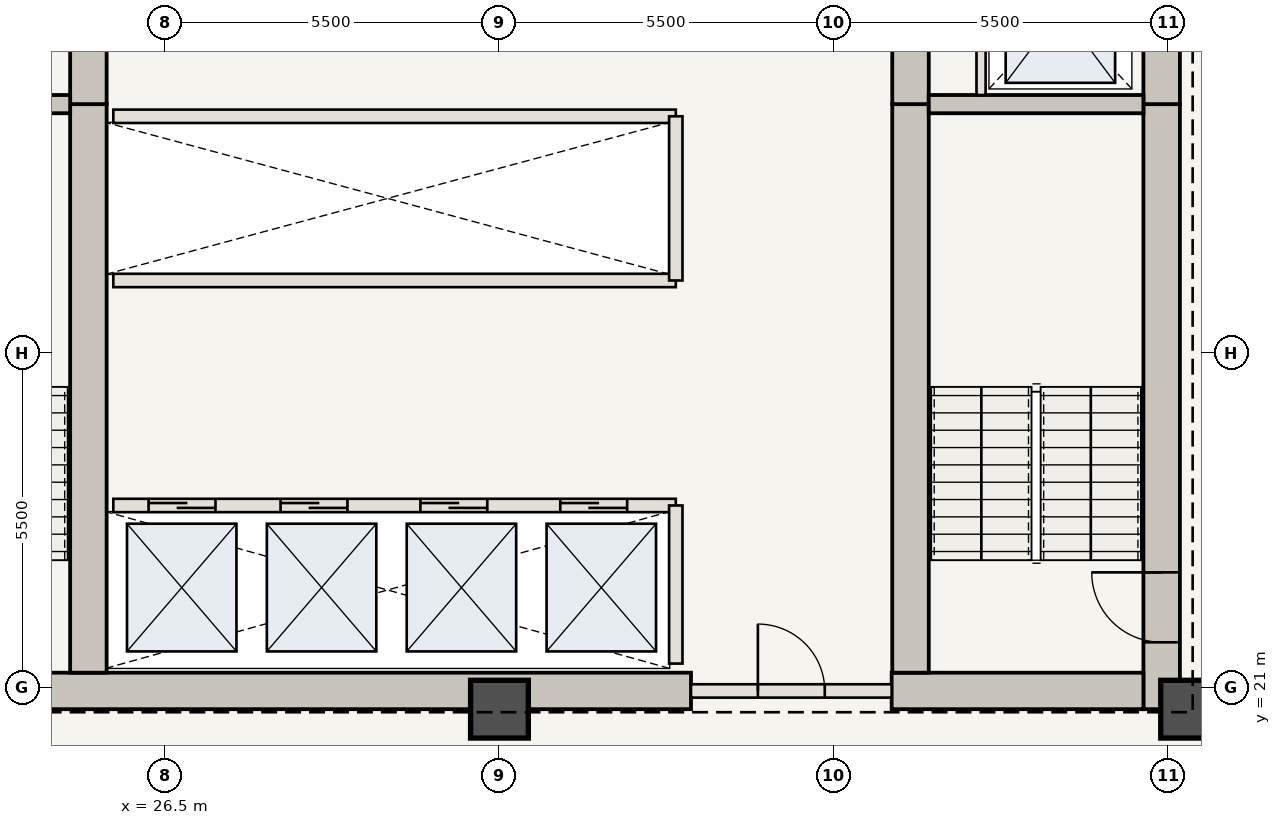
"""IFC4 building model, lengths in metres.
Left out: names, types, materials, properties, quantities, classifications, styles, units other than length and angle.
Written with IfcOpenShell. Run it as: python <this file> out.ifc"""

import sys

from ifc_helpers import new_model, si_unit, direction, frame, frame_2d, origin, origin_2d, place, context, subcontext, project, spatial, rectangle, extrude, element, fill, save


model = new_model("IFC4")
c1 = context("Model", 3, precision=1e-05, world=origin(), true_north=direction((0.0, 1.0)))
c2 = subcontext(c1, "Body", "Model", "MODEL_VIEW")
j1 = project(units=[si_unit("LENGTHUNIT", "METRE"), si_unit("PLANEANGLEUNIT", "RADIAN")], contexts=[c1])
p1 = place(None, origin())
s1 = spatial("IfcSite", under=j1, at=p1, CompositionType="ELEMENT")
p2 = place(p1, origin())
s2 = spatial("IfcBuilding", under=s1, at=p2, CompositionType="ELEMENT")
p3 = place(p2, frame((0.0, 0.0, 160.65)))
s3 = spatial("IfcBuildingStorey", under=s2, at=p3, CompositionType="ELEMENT", Elevation=160.65)
p4 = place(p3, frame((42.89, 20.65, 0.0), z_axis=(0.0, 0.0, 1.0), x_axis=(0.0, 1.0, 0.0)))
e1 = element("IfcWall", 1, at=p4, inside=s3, PredefinedType="SHEAR", context=c2, shape_type="SweptSolid", body=[
    extrude(rectangle(XDim=9.95, YDim=0.6, at=frame_2d((4.975, 0.0))), origin(), (0.0, 0.0, 1.0), 3.85),
])
p5 = place(p4, frame((1.1, 0.0, 0.0)))
e2 = element("IfcOpeningElement", 2, at=p5, cuts=e1, PredefinedType="OPENING", context=c2, shape_type="SweptSolid", body=[
    extrude(rectangle(XDim=1.15, YDim=2.15, at=frame_2d((0.575, 1.075))), frame((0.0, 0.31, 0.0), z_axis=(0.0, -1.0, 0.0), x_axis=(1.0, 0.0, 0.0)), (0.0, 0.0, 1.0), 0.62),
])
p6 = place(p3, frame((42.89, 30.6, 0.0), z_axis=(0.0, 0.0, 1.0), x_axis=(0.0, 1.0, 0.0)))
e3 = element("IfcWall", 3, at=p6, inside=s3, PredefinedType="SHEAR", context=c2, shape_type="SweptSolid", body=[
    extrude(rectangle(XDim=12.7, YDim=0.6, at=frame_2d((6.35, 0.0))), origin(), (0.0, 0.0, 1.0), 3.85),
])
p7 = place(p6, frame((4.2, 0.0, 0.0)))
e4 = element("IfcOpeningElement", 4, at=p7, cuts=e3, PredefinedType="OPENING", context=c2, shape_type="SweptSolid", body=[
    extrude(rectangle(XDim=1.1, YDim=2.15, at=frame_2d((0.55, 1.075))), frame((0.0, 0.31, 0.0), z_axis=(0.0, -1.0, 0.0), x_axis=(1.0, 0.0, 0.0)), (0.0, 0.0, 1.0), 0.62),
])
p8 = place(p6, frame((8.4, 0.0, 0.0)))
e5 = element("IfcOpeningElement", 5, at=p8, cuts=e3, PredefinedType="OPENING", context=c2, shape_type="SweptSolid", body=[
    extrude(rectangle(XDim=0.88, YDim=2.1, at=frame_2d((0.44, 1.05))), frame((0.0, 0.31, 0.0), z_axis=(0.0, -1.0, 0.0), x_axis=(1.0, 0.0, 0.0)), (0.0, 0.0, 1.0), 0.62),
])
p9 = place(p6, frame((10.5, 0.0, 0.0)))
e6 = element("IfcOpeningElement", 6, at=p9, cuts=e3, PredefinedType="OPENING", context=c2, shape_type="SweptSolid", body=[
    extrude(rectangle(XDim=0.88, YDim=2.1, at=frame_2d((0.44, 1.05))), frame((0.0, 0.31, 0.0), z_axis=(0.0, -1.0, 0.0), x_axis=(1.0, 0.0, 0.0)), (0.0, 0.0, 1.0), 0.62),
])
p10 = place(p3, frame((21.41, 20.95, 0.0), z_axis=(0.0, 0.0, 1.0), x_axis=(1.0, 0.0, 0.0)))
e7 = element("IfcWall", 7, at=p10, inside=s3, PredefinedType="SHEAR", context=c2, shape_type="SweptSolid", body=[
    extrude(rectangle(XDim=13.74, YDim=0.6, at=frame_2d((6.87, 0.0))), origin(), (0.0, 0.0, 1.0), 3.85),
])
p11 = place(p3, frame((38.45, 20.95, 0.0), z_axis=(0.0, 0.0, 1.0), x_axis=(1.0, 0.0, 0.0)))
e8 = element("IfcWall", 8, at=p11, inside=s3, PredefinedType="SHEAR", context=c2, shape_type="SweptSolid", body=[
    extrude(rectangle(XDim=4.14, YDim=0.6, at=frame_2d((2.07, 0.0))), origin(), (0.0, 0.0, 1.0), 3.85),
])
p12 = place(p3, frame((25.24, 21.25, 0.0), z_axis=(0.0, 0.0, 1.0), x_axis=(0.0, 1.0, 0.0)))
e9 = element("IfcWall", 9, at=p12, inside=s3, PredefinedType="SHEAR", context=c2, shape_type="SweptSolid", body=[
    extrude(rectangle(XDim=9.35, YDim=0.6, at=frame_2d((4.675, 0.0))), origin(), (0.0, 0.0, 1.0), 3.85),
])
p13 = place(p3, frame((25.24, 30.6, 0.0), z_axis=(0.0, 0.0, 1.0), x_axis=(0.0, 1.0, 0.0)))
e10 = element("IfcWall", 10, at=p13, inside=s3, PredefinedType="SHEAR", context=c2, shape_type="SweptSolid", body=[
    extrude(rectangle(XDim=12.1, YDim=0.6, at=frame_2d((6.05, 0.0))), origin(), (0.0, 0.0, 1.0), 3.85),
])
p14 = place(p13, frame((6.25, 0.0, 0.0)))
e11 = element("IfcOpeningElement", 11, at=p14, cuts=e10, PredefinedType="OPENING", context=c2, shape_type="SweptSolid", body=[
    extrude(rectangle(XDim=1.1, YDim=2.15, at=frame_2d((0.55, 1.075))), frame((0.0, 0.31, 0.0), z_axis=(0.0, -1.0, 0.0), x_axis=(1.0, 0.0, 0.0)), (0.0, 0.0, 1.0), 0.62),
])
p15 = place(p3, frame((38.76, 21.25, 0.0), z_axis=(0.0, 0.0, 1.0), x_axis=(0.0, 1.0, 0.0)))
e12 = element("IfcWall", 12, at=p15, inside=s3, PredefinedType="SHEAR", context=c2, shape_type="SweptSolid", body=[
    extrude(rectangle(XDim=9.35, YDim=0.6, at=frame_2d((4.675, 0.0))), origin(), (0.0, 0.0, 1.0), 3.85),
])
p16 = place(p3, frame((38.76, 30.6, 0.0), z_axis=(0.0, 0.0, 1.0), x_axis=(0.0, 1.0, 0.0)))
e13 = element("IfcWall", 13, at=p16, inside=s3, PredefinedType="SHEAR", context=c2, shape_type="SweptSolid", body=[
    extrude(rectangle(XDim=12.1, YDim=0.6, at=frame_2d((6.05, 0.0))), origin(), (0.0, 0.0, 1.0), 3.85),
])
for number, where, z_axis, x_axis in (
    (14, (32.0, 20.65, 0.0), (0.0, 0.0, 1.0), (1.0, 0.0, 0.0)),
    (15, (43.35, 20.65, 0.0), (0.0, 0.0, 1.0), (1.0, 0.0, 0.0)),
):
    element("IfcColumn", number, at=place(p3, frame(where, z_axis=z_axis, x_axis=x_axis)), inside=s3, PredefinedType="COLUMN", context=c2, shape_type="SweptSolid", body=[
        extrude(rectangle(XDim=0.95, YDim=0.95, at=origin_2d()), origin(), (0.0, 0.0, 1.0), 3.85),
    ])
for number, where, z_axis, x_axis in (
    (16, (21.41, 30.6, 0.0), (0.0, 0.0, 1.0), (1.0, 0.0, 0.0)),
    (17, (39.06, 30.6, 0.0), (0.0, 0.0, 1.0), (1.0, 0.0, 0.0)),
):
    element("IfcWall", number, at=place(p3, frame(where, z_axis=z_axis, x_axis=x_axis)), inside=s3, PredefinedType="SHEAR", context=c2, shape_type="SweptSolid", body=[
        extrude(rectangle(XDim=3.53, YDim=0.3, at=frame_2d((1.765, 0.0))), origin(), (0.0, 0.0, 1.0), 3.685),
    ])
p17 = place(p3, frame((39.92, 30.75, 0.0), z_axis=(0.0, 0.0, 1.0), x_axis=(0.0, 1.0, 0.0)))
e18 = element("IfcWall", 18, at=p17, inside=s3, PredefinedType="STANDARD", context=c2, shape_type="SweptSolid", body=[
    extrude(rectangle(XDim=2.65, YDim=0.15, at=frame_2d((1.325, 0.0))), origin(), (0.0, 0.0, 1.0), 3.685),
])
p18 = place(p3, frame((35.15, 20.95, 0.0), z_axis=(0.0, 0.0, 1.0), x_axis=(1.0, 0.0, 0.0)))
e19 = element("IfcWall", 19, at=p18, inside=s3, PredefinedType="STANDARD", context=c2, shape_type="SweptSolid", body=[
    extrude(rectangle(XDim=3.3, YDim=0.22, at=frame_2d((1.65, 0.0))), origin(), (0.0, 0.0, 1.0), 3.685),
])
p19 = place(p18, frame((1.1, 0.0, 0.0)))
e20 = element("IfcOpeningElement", 20, at=p19, cuts=e19, PredefinedType="OPENING", context=c2, shape_type="SweptSolid", body=[
    extrude(rectangle(XDim=1.1, YDim=2.15, at=frame_2d((0.55, 1.075))), frame((0.0, 0.12, 0.0), z_axis=(0.0, -1.0, 0.0), x_axis=(1.0, 0.0, 0.0)), (0.0, 0.0, 1.0), 0.24),
])
p20 = place(p3, frame((25.65, 24.0, 0.0), z_axis=(0.0, 0.0, 1.0), x_axis=(1.0, 0.0, 0.0)))
e21 = element("IfcWall", 21, at=p20, inside=s3, PredefinedType="STANDARD", context=c2, shape_type="SweptSolid", body=[
    extrude(rectangle(XDim=9.25, YDim=0.22, at=frame_2d((4.625, 0.0))), origin(), (0.0, 0.0, 1.0), 3.685),
])
p21 = place(p20, frame((0.58, 0.0, 0.0)))
e22 = element("IfcOpeningElement", 22, at=p21, cuts=e21, PredefinedType="OPENING", context=c2, shape_type="SweptSolid", body=[
    extrude(rectangle(XDim=1.1, YDim=2.15, at=frame_2d((0.55, 1.075))), frame((0.0, 0.12, 0.0), z_axis=(0.0, -1.0, 0.0), x_axis=(1.0, 0.0, 0.0)), (0.0, 0.0, 1.0), 0.24),
])
p22 = place(p20, frame((2.75, 0.0, 0.0)))
e23 = element("IfcOpeningElement", 23, at=p22, cuts=e21, PredefinedType="OPENING", context=c2, shape_type="SweptSolid", body=[
    extrude(rectangle(XDim=1.1, YDim=2.15, at=frame_2d((0.55, 1.075))), frame((0.0, 0.12, 0.0), z_axis=(0.0, -1.0, 0.0), x_axis=(1.0, 0.0, 0.0)), (0.0, 0.0, 1.0), 0.24),
])
p23 = place(p20, frame((5.05, 0.0, 0.0)))
e24 = element("IfcOpeningElement", 24, at=p23, cuts=e21, PredefinedType="OPENING", context=c2, shape_type="SweptSolid", body=[
    extrude(rectangle(XDim=1.1, YDim=2.15, at=frame_2d((0.55, 1.075))), frame((0.0, 0.12, 0.0), z_axis=(0.0, -1.0, 0.0), x_axis=(1.0, 0.0, 0.0)), (0.0, 0.0, 1.0), 0.24),
])
p24 = place(p20, frame((7.35, 0.0, 0.0)))
e25 = element("IfcOpeningElement", 25, at=p24, cuts=e21, PredefinedType="OPENING", context=c2, shape_type="SweptSolid", body=[
    extrude(rectangle(XDim=1.1, YDim=2.15, at=frame_2d((0.55, 1.075))), frame((0.0, 0.12, 0.0), z_axis=(0.0, -1.0, 0.0), x_axis=(1.0, 0.0, 0.0)), (0.0, 0.0, 1.0), 0.24),
])
p25 = place(p3, frame((34.9, 21.4, 0.0), z_axis=(0.0, 0.0, 1.0), x_axis=(0.0, 1.0, 0.0)))
e26 = element("IfcWall", 26, at=p25, inside=s3, PredefinedType="STANDARD", context=c2, shape_type="SweptSolid", body=[
    extrude(rectangle(XDim=2.6, YDim=0.22, at=frame_2d((1.3, 0.0))), origin(), (0.0, 0.0, 1.0), 3.685),
])
for number, where, z_axis, x_axis in (
    (27, (25.65, 27.7, 0.0), (0.0, 0.0, 1.0), (1.0, 0.0, 0.0)),
    (28, (25.65, 30.4, 0.0), (0.0, 0.0, 1.0), (1.0, 0.0, 0.0)),
):
    element("IfcWall", number, at=place(p3, frame(where, z_axis=z_axis, x_axis=x_axis)), inside=s3, PredefinedType="STANDARD", context=c2, shape_type="SweptSolid", body=[
        extrude(rectangle(XDim=9.25, YDim=0.22, at=frame_2d((4.625, 0.0))), origin(), (0.0, 0.0, 1.0), 3.685),
    ])
p26 = place(p3, frame((34.9, 27.7, 0.0), z_axis=(0.0, 0.0, 1.0), x_axis=(0.0, 1.0, 0.0)))
e29 = element("IfcWall", 29, at=p26, inside=s3, PredefinedType="STANDARD", context=c2, shape_type="SweptSolid", body=[
    extrude(rectangle(XDim=2.7, YDim=0.22, at=frame_2d((1.35, 0.0))), origin(), (0.0, 0.0, 1.0), 3.685),
])
p27 = place(p5, origin())
e30 = element("IfcDoor", 30, at=p27, inside=s3, OperationType="SINGLE_SWING_RIGHT", PredefinedType="DOOR", context=c2, shape_type="SweptSolid", body=[
    extrude(rectangle(XDim=1.15, YDim=2.15, at=frame_2d((0.575, 1.075))), frame((0.0, 0.025, 0.0), z_axis=(0.0, -1.0, 0.0), x_axis=(1.0, 0.0, 0.0)), (0.0, 0.0, 1.0), 0.05),
])
fill(e2, e30)
p28 = place(p19, origin())
e31 = element("IfcDoor", 31, at=p28, inside=s3, OperationType="SINGLE_SWING_LEFT", PredefinedType="DOOR", context=c2, shape_type="SweptSolid", body=[
    extrude(rectangle(XDim=1.1, YDim=2.15, at=frame_2d((0.55, 1.075))), frame((0.0, 0.025, 0.0), z_axis=(0.0, -1.0, 0.0), x_axis=(1.0, 0.0, 0.0)), (0.0, 0.0, 1.0), 0.05),
])
fill(e20, e31)
p29 = place(p21, origin())
e32 = element("IfcDoor", 32, at=p29, inside=s3, OperationType="DOUBLE_DOOR_SLIDING", PredefinedType="DOOR", context=c2, shape_type="SweptSolid", body=[
    extrude(rectangle(XDim=1.1, YDim=2.15, at=frame_2d((0.55, 1.075))), frame((0.0, 0.025, 0.0), z_axis=(0.0, -1.0, 0.0), x_axis=(1.0, 0.0, 0.0)), (0.0, 0.0, 1.0), 0.05),
])
fill(e22, e32)
p30 = place(p22, origin())
e33 = element("IfcDoor", 33, at=p30, inside=s3, OperationType="DOUBLE_DOOR_SLIDING", PredefinedType="DOOR", context=c2, shape_type="SweptSolid", body=[
    extrude(rectangle(XDim=1.1, YDim=2.15, at=frame_2d((0.55, 1.075))), frame((0.0, 0.025, 0.0), z_axis=(0.0, -1.0, 0.0), x_axis=(1.0, 0.0, 0.0)), (0.0, 0.0, 1.0), 0.05),
])
fill(e23, e33)
p31 = place(p23, origin())
e34 = element("IfcDoor", 34, at=p31, inside=s3, OperationType="DOUBLE_DOOR_SLIDING", PredefinedType="DOOR", context=c2, shape_type="SweptSolid", body=[
    extrude(rectangle(XDim=1.1, YDim=2.15, at=frame_2d((0.55, 1.075))), frame((0.0, 0.025, 0.0), z_axis=(0.0, -1.0, 0.0), x_axis=(1.0, 0.0, 0.0)), (0.0, 0.0, 1.0), 0.05),
])
fill(e24, e34)
p32 = place(p24, origin())
e35 = element("IfcDoor", 35, at=p32, inside=s3, OperationType="DOUBLE_DOOR_SLIDING", PredefinedType="DOOR", context=c2, shape_type="SweptSolid", body=[
    extrude(rectangle(XDim=1.1, YDim=2.15, at=frame_2d((0.55, 1.075))), frame((0.0, 0.025, 0.0), z_axis=(0.0, -1.0, 0.0), x_axis=(1.0, 0.0, 0.0)), (0.0, 0.0, 1.0), 0.05),
])
fill(e25, e35)
save(model, sys.argv[1])
